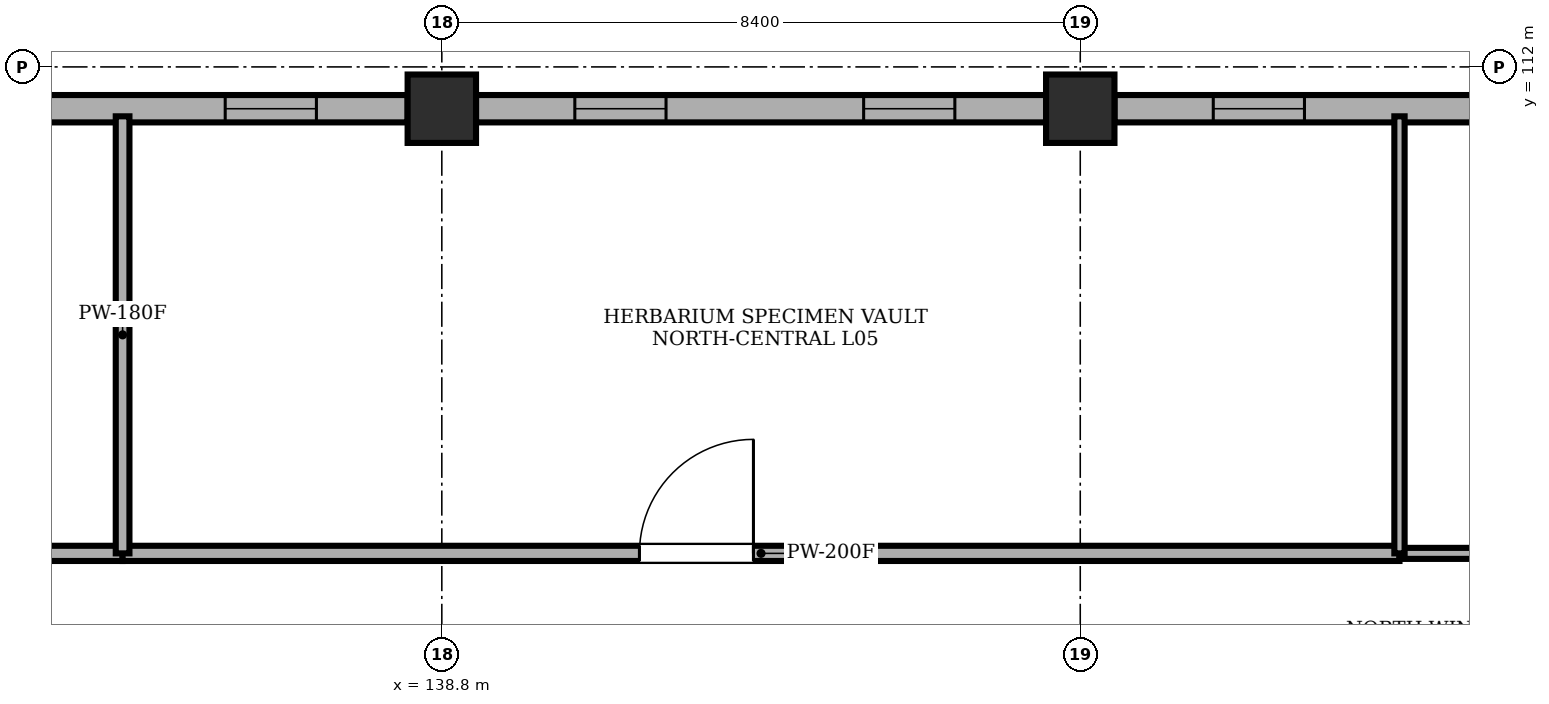
"""IFC4 building model, lengths in metres.
Left out: names, types, materials, properties, quantities, classifications, styles, units other than length and angle.
Written with IfcOpenShell. Run it as: python <this file> out.ifc"""

import sys

from ifc_helpers import new_model, si_unit, direction, frame, frame_2d, origin, origin_2d, place, context, subcontext, project, spatial, rectangle, extrude, element, fill, save


model = new_model("IFC4")
c1 = context("Model", 3, precision=1e-05, world=origin(), true_north=direction((0.0, 1.0)))
c2 = subcontext(c1, "Body", "Model", "MODEL_VIEW")
j1 = project(units=[si_unit("LENGTHUNIT", "METRE"), si_unit("PLANEANGLEUNIT", "RADIAN")], contexts=[c1])
p1 = place(None, origin())
s1 = spatial("IfcSite", under=j1, at=p1, CompositionType="ELEMENT")
p2 = place(p1, origin())
s2 = spatial("IfcBuilding", under=s1, at=p2, CompositionType="ELEMENT")
p3 = place(p2, frame((0.0, 0.0, 19.2)))
s3 = spatial("IfcBuildingStorey", under=s2, at=p3, CompositionType="ELEMENT", Elevation=19.2)
for number, where, z_axis, x_axis in (
    (1, (138.8, 111.45, 0.0), (0.0, 0.0, 1.0), (1.0, 0.0, 0.0)),
    (2, (147.2, 111.45, 0.0), (0.0, 0.0, 1.0), (1.0, 0.0, 0.0)),
):
    element("IfcColumn", number, at=place(p3, frame(where, z_axis=z_axis, x_axis=x_axis)), inside=s3, PredefinedType="COLUMN", context=c2, shape_type="SweptSolid", body=[
        extrude(rectangle(XDim=0.9, YDim=0.9, at=origin_2d()), origin(), (0.0, 0.0, 1.0), 4.02),
    ])
p4 = place(p3, frame((130.85, 111.45, 0.0), z_axis=(0.0, 0.0, 1.0), x_axis=(1.0, 0.0, 0.0)))
e3 = element("IfcWall", 3, at=p4, inside=s3, PredefinedType="STANDARD", context=c2, shape_type="SweptSolid", body=[
    extrude(rectangle(XDim=7.5, YDim=0.36, at=frame_2d((3.75, 0.0))), origin(), (0.0, 0.0, 1.0), 3.32),
])
p5 = place(p4, frame((1.3, 0.0, 1.1)))
e4 = element("IfcOpeningElement", 4, at=p5, cuts=e3, PredefinedType="OPENING", context=c2, shape_type="SweptSolid", body=[
    extrude(rectangle(XDim=1.2, YDim=1.5, at=frame_2d((0.6, 0.75))), frame((0.0, 0.19, 0.0), z_axis=(0.0, -1.0, 0.0), x_axis=(1.0, 0.0, 0.0)), (0.0, 0.0, 1.0), 0.38),
])
p6 = place(p4, frame((5.1, 0.0, 1.1)))
e5 = element("IfcOpeningElement", 5, at=p6, cuts=e3, PredefinedType="OPENING", context=c2, shape_type="SweptSolid", body=[
    extrude(rectangle(XDim=1.2, YDim=1.5, at=frame_2d((0.6, 0.75))), frame((0.0, 0.19, 0.0), z_axis=(0.0, -1.0, 0.0), x_axis=(1.0, 0.0, 0.0)), (0.0, 0.0, 1.0), 0.38),
])
p7 = place(p3, frame((139.25, 111.45, 0.0), z_axis=(0.0, 0.0, 1.0), x_axis=(1.0, 0.0, 0.0)))
e6 = element("IfcWall", 6, at=p7, inside=s3, PredefinedType="STANDARD", context=c2, shape_type="SweptSolid", body=[
    extrude(rectangle(XDim=7.5, YDim=0.36, at=frame_2d((3.75, 0.0))), origin(), (0.0, 0.0, 1.0), 3.32),
])
p8 = place(p7, frame((1.3, 0.0, 1.1)))
e7 = element("IfcOpeningElement", 7, at=p8, cuts=e6, PredefinedType="OPENING", context=c2, shape_type="SweptSolid", body=[
    extrude(rectangle(XDim=1.2, YDim=1.5, at=frame_2d((0.6, 0.75))), frame((0.0, 0.19, 0.0), z_axis=(0.0, -1.0, 0.0), x_axis=(1.0, 0.0, 0.0)), (0.0, 0.0, 1.0), 0.38),
])
p9 = place(p7, frame((5.1, 0.0, 1.1)))
e8 = element("IfcOpeningElement", 8, at=p9, cuts=e6, PredefinedType="OPENING", context=c2, shape_type="SweptSolid", body=[
    extrude(rectangle(XDim=1.2, YDim=1.5, at=frame_2d((0.6, 0.75))), frame((0.0, 0.19, 0.0), z_axis=(0.0, -1.0, 0.0), x_axis=(1.0, 0.0, 0.0)), (0.0, 0.0, 1.0), 0.38),
])
p10 = place(p3, frame((147.65, 111.45, 0.0), z_axis=(0.0, 0.0, 1.0), x_axis=(1.0, 0.0, 0.0)))
e9 = element("IfcWall", 9, at=p10, inside=s3, PredefinedType="STANDARD", context=c2, shape_type="SweptSolid", body=[
    extrude(rectangle(XDim=7.5, YDim=0.36, at=frame_2d((3.75, 0.0))), origin(), (0.0, 0.0, 1.0), 3.32),
])
p11 = place(p10, frame((1.3, 0.0, 1.1)))
e10 = element("IfcOpeningElement", 10, at=p11, cuts=e9, PredefinedType="OPENING", context=c2, shape_type="SweptSolid", body=[
    extrude(rectangle(XDim=1.2, YDim=1.5, at=frame_2d((0.6, 0.75))), frame((0.0, 0.19, 0.0), z_axis=(0.0, -1.0, 0.0), x_axis=(1.0, 0.0, 0.0)), (0.0, 0.0, 1.0), 0.38),
])
p12 = place(p10, frame((5.1, 0.0, 1.1)))
e11 = element("IfcOpeningElement", 11, at=p12, cuts=e9, PredefinedType="OPENING", context=c2, shape_type="SweptSolid", body=[
    extrude(rectangle(XDim=1.2, YDim=1.5, at=frame_2d((0.6, 0.75))), frame((0.0, 0.19, 0.0), z_axis=(0.0, -1.0, 0.0), x_axis=(1.0, 0.0, 0.0)), (0.0, 0.0, 1.0), 0.38),
])
p13 = place(p3, frame((122.15, 105.6, 0.0), z_axis=(0.0, 0.0, 1.0), x_axis=(1.0, 0.0, 0.0)))
e12 = element("IfcWall", 12, at=p13, inside=s3, PredefinedType="SOLIDWALL", context=c2, shape_type="SweptSolid", body=[
    extrude(rectangle(XDim=12.45, YDim=0.2, at=frame_2d((6.225, 0.0))), origin(), (0.0, 0.0, 1.0), 4.02),
])
p14 = place(p13, frame((3.75, 0.0, 0.0)))
e13 = element("IfcOpeningElement", 13, at=p14, cuts=e12, PredefinedType="OPENING", context=c2, shape_type="SweptSolid", body=[
    extrude(rectangle(XDim=1.5, YDim=2.2, at=frame_2d((0.75, 1.1))), frame((0.0, 0.11, 0.0), z_axis=(0.0, -1.0, 0.0), x_axis=(1.0, 0.0, 0.0)), (0.0, 0.0, 1.0), 0.22),
])
p15 = place(p3, frame((134.6, 105.6, 0.0), z_axis=(0.0, 0.0, 1.0), x_axis=(1.0, 0.0, 0.0)))
e14 = element("IfcWall", 14, at=p15, inside=s3, PredefinedType="SOLIDWALL", context=c2, shape_type="SweptSolid", body=[
    extrude(rectangle(XDim=16.8, YDim=0.2, at=frame_2d((8.4, 0.0))), origin(), (0.0, 0.0, 1.0), 4.02),
])
p16 = place(p15, frame((6.8, 0.0, 0.0)))
e15 = element("IfcOpeningElement", 15, at=p16, cuts=e14, PredefinedType="OPENING", context=c2, shape_type="SweptSolid", body=[
    extrude(rectangle(XDim=1.5, YDim=2.2, at=frame_2d((0.75, 1.1))), frame((0.0, 0.11, 0.0), z_axis=(0.0, -1.0, 0.0), x_axis=(1.0, 0.0, 0.0)), (0.0, 0.0, 1.0), 0.22),
])
p17 = place(p3, frame((134.6, 105.6, 0.0), z_axis=(0.0, 0.0, 1.0), x_axis=(0.0, 1.0, 0.0)))
e16 = element("IfcWall", 16, at=p17, inside=s3, PredefinedType="STANDARD", context=c2, shape_type="SweptSolid", body=[
    extrude(rectangle(XDim=5.75, YDim=0.18, at=frame_2d((2.875, 0.0))), origin(), (0.0, 0.0, 1.0), 3.52),
])
p18 = place(p3, frame((151.4, 105.6, 0.0), z_axis=(0.0, 0.0, 1.0), x_axis=(1.0, 0.0, 0.0)))
e17 = element("IfcWall", 17, at=p18, inside=s3, PredefinedType="PARTITIONING", context=c2, shape_type="SweptSolid", body=[
    extrude(rectangle(XDim=11.95, YDim=0.145, at=frame_2d((5.975, 0.0))), origin(), (0.0, 0.0, 1.0), 4.02),
])
p19 = place(p18, frame((6.8, 0.0, 0.0)))
e18 = element("IfcOpeningElement", 18, at=p19, cuts=e17, PredefinedType="OPENING", context=c2, shape_type="SweptSolid", body=[
    extrude(rectangle(XDim=1.02, YDim=2.15, at=frame_2d((0.51, 1.075))), frame((0.0, 0.083, 0.0), z_axis=(0.0, -1.0, 0.0), x_axis=(1.0, 0.0, 0.0)), (0.0, 0.0, 1.0), 0.165),
])
p20 = place(p3, frame((151.4, 105.6, 0.0), z_axis=(0.0, 0.0, 1.0), x_axis=(0.0, 1.0, 0.0)))
e19 = element("IfcWall", 19, at=p20, inside=s3, PredefinedType="PARTITIONING", context=c2, shape_type="SweptSolid", body=[
    extrude(rectangle(XDim=5.75, YDim=0.135, at=frame_2d((2.875, 0.0))), origin(), (0.0, 0.0, 1.0), 3.52),
])
p21 = place(p6, origin())
e20 = element("IfcWindow", 20, at=p21, inside=s3, PartitioningType="SINGLE_PANEL", PredefinedType="WINDOW", context=c2, shape_type="SweptSolid", body=[
    extrude(rectangle(XDim=1.2, YDim=1.5, at=frame_2d((0.6, 0.75))), frame((0.0, 0.03, 0.0), z_axis=(0.0, -1.0, 0.0), x_axis=(1.0, 0.0, 0.0)), (0.0, 0.0, 1.0), 0.06),
])
fill(e5, e20)
p22 = place(p8, origin())
e21 = element("IfcWindow", 21, at=p22, inside=s3, PartitioningType="SINGLE_PANEL", PredefinedType="WINDOW", context=c2, shape_type="SweptSolid", body=[
    extrude(rectangle(XDim=1.2, YDim=1.5, at=frame_2d((0.6, 0.75))), frame((0.0, 0.03, 0.0), z_axis=(0.0, -1.0, 0.0), x_axis=(1.0, 0.0, 0.0)), (0.0, 0.0, 1.0), 0.06),
])
fill(e7, e21)
p23 = place(p9, origin())
e22 = element("IfcWindow", 22, at=p23, inside=s3, PartitioningType="SINGLE_PANEL", PredefinedType="WINDOW", context=c2, shape_type="SweptSolid", body=[
    extrude(rectangle(XDim=1.2, YDim=1.5, at=frame_2d((0.6, 0.75))), frame((0.0, 0.03, 0.0), z_axis=(0.0, -1.0, 0.0), x_axis=(1.0, 0.0, 0.0)), (0.0, 0.0, 1.0), 0.06),
])
fill(e8, e22)
p24 = place(p11, origin())
e23 = element("IfcWindow", 23, at=p24, inside=s3, PartitioningType="SINGLE_PANEL", PredefinedType="WINDOW", context=c2, shape_type="SweptSolid", body=[
    extrude(rectangle(XDim=1.2, YDim=1.5, at=frame_2d((0.6, 0.75))), frame((0.0, 0.03, 0.0), z_axis=(0.0, -1.0, 0.0), x_axis=(1.0, 0.0, 0.0)), (0.0, 0.0, 1.0), 0.06),
])
fill(e10, e23)
p25 = place(p16, origin())
e24 = element("IfcDoor", 24, at=p25, inside=s3, OperationType="SINGLE_SWING_RIGHT", PredefinedType="DOOR", context=c2, shape_type="SweptSolid", body=[
    extrude(rectangle(XDim=1.5, YDim=2.2, at=frame_2d((0.75, 1.1))), frame((0.0, 0.025, 0.0), z_axis=(0.0, -1.0, 0.0), x_axis=(1.0, 0.0, 0.0)), (0.0, 0.0, 1.0), 0.05),
])
fill(e15, e24)
save(model, sys.argv[1])
